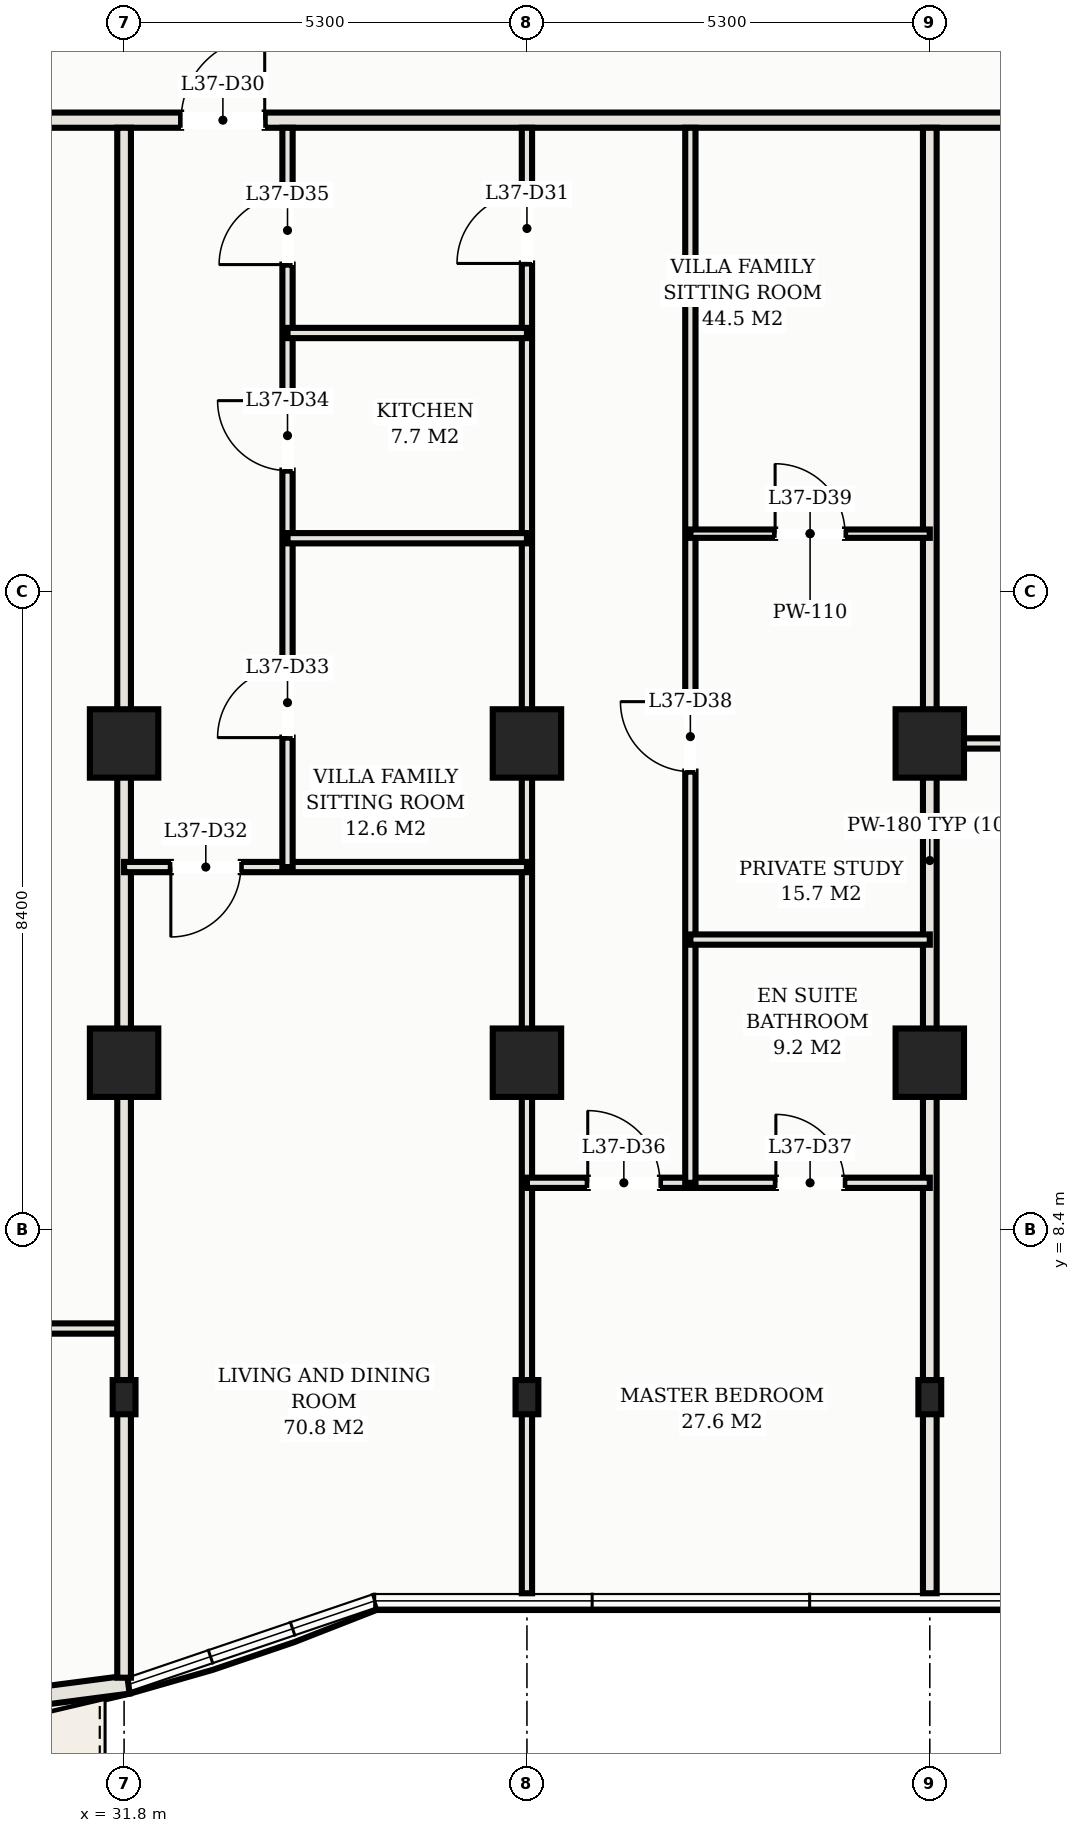
"""IFC4 building model, lengths in metres.
Left out: names, types, materials, properties, quantities, classifications, styles, units other than length and angle.
Written with IfcOpenShell. Run it as: python <this file> out.ifc"""

import sys

from ifc_helpers import new_model, si_unit, direction, frame, frame_2d, origin, origin_2d, place, context, subcontext, project, spatial, rectangle, hollow_rectangle, extrude, element, fill, save


model = new_model("IFC4")
c1 = context("Model", 3, precision=1e-05, world=origin(), true_north=direction((0.0, 1.0)))
c2 = subcontext(c1, "Body", "Model", "MODEL_VIEW")
j1 = project(units=[si_unit("LENGTHUNIT", "METRE"), si_unit("PLANEANGLEUNIT", "RADIAN")], contexts=[c1])
p1 = place(None, origin())
s1 = spatial("IfcSite", under=j1, at=p1, CompositionType="ELEMENT")
p2 = place(p1, origin())
s2 = spatial("IfcBuilding", under=s1, at=p2, CompositionType="ELEMENT")
p3 = place(p2, frame((0.0, 0.0, 139.2)))
s3 = spatial("IfcBuildingStorey", under=s2, at=p3, CompositionType="ELEMENT", Elevation=139.2)
for number, where, z_axis, x_axis in (
    (1, (31.8, 14.8, 0.0), (0.0, 0.0, 1.0), (1.0, 0.0, 0.0)),
    (2, (31.8, 10.6, 0.0), (0.0, 0.0, 1.0), (1.0, 0.0, 0.0)),
    (3, (37.1, 14.8, 0.0), (0.0, 0.0, 1.0), (1.0, 0.0, 0.0)),
    (4, (37.1, 10.6, 0.0), (0.0, 0.0, 1.0), (1.0, 0.0, 0.0)),
    (5, (42.4, 14.8, 0.0), (0.0, 0.0, 1.0), (1.0, 0.0, 0.0)),
    (6, (42.4, 10.6, 0.0), (0.0, 0.0, 1.0), (1.0, 0.0, 0.0)),
):
    element("IfcColumn", number, at=place(p3, frame(where, z_axis=z_axis, x_axis=x_axis)), inside=s3, PredefinedType="COLUMN", context=c2, shape_type="SweptSolid", body=[
        extrude(hollow_rectangle(XDim=0.9, YDim=0.9, WallThickness=0.032, at=origin_2d()), origin(), (0.0, 0.0, 1.0), 3.3),
    ])
for number, where, z_axis, x_axis in (
    (7, (31.8, 6.2, 0.0), (0.0, 0.0, 1.0), (1.0, 0.0, 0.0)),
    (8, (37.1, 6.2, 0.0), (0.0, 0.0, 1.0), (1.0, 0.0, 0.0)),
    (9, (42.4, 6.2, 0.0), (0.0, 0.0, 1.0), (1.0, 0.0, 0.0)),
):
    element("IfcColumn", number, at=place(p3, frame(where, z_axis=z_axis, x_axis=x_axis)), inside=s3, PredefinedType="COLUMN", context=c2, shape_type="SweptSolid", body=[
        extrude(hollow_rectangle(XDim=0.3, YDim=0.45, WallThickness=0.016, at=origin_2d()), origin(), (0.0, 0.0, 1.0), 3.3),
    ])
p4 = place(p3, frame((26.5, 1.72, 0.0), z_axis=(0.0, 0.0, 1.0), x_axis=(0.991594614239, 0.129383619568, 0.0)))
e10 = element("IfcWall", 10, at=p4, inside=s3, PredefinedType="SOLIDWALL", context=c2, shape_type="SweptSolid", body=[
    extrude(rectangle(XDim=5.402, YDim=0.24, at=frame_2d((2.701, 0.0))), origin(), (0.0, 0.0, 1.0), 3.1),
])
p5 = place(p4, frame((1.931, 0.0, 0.0)))
e11 = element("IfcOpeningElement", 11, at=p5, cuts=e10, PredefinedType="OPENING", context=c2, shape_type="SweptSolid", body=[
    extrude(rectangle(XDim=1.8, YDim=2.2, at=frame_2d((0.9, 1.1))), frame((0.0, 0.13, 0.0), z_axis=(0.0, -1.0, 0.0), x_axis=(1.0, 0.0, 0.0)), (0.0, 0.0, 1.0), 0.26),
])
p6 = place(p3, frame((4.32, 23.0, 0.0), z_axis=(0.0, 0.0, 1.0), x_axis=(1.0, 0.0, 0.0)))
e12 = element("IfcWall", 12, at=p6, inside=s3, PredefinedType="PARTITIONING", context=c2, shape_type="SweptSolid", body=[
    extrude(rectangle(XDim=44.36, YDim=0.2, at=frame_2d((22.18, 0.0))), origin(), (0.0, 0.0, 1.0), 2.38),
])
p7 = place(p6, frame((7.03, 0.0, 0.0)))
e13 = element("IfcOpeningElement", 13, at=p7, cuts=e12, PredefinedType="OPENING", context=c2, shape_type="SweptSolid", body=[
    extrude(rectangle(XDim=1.1, YDim=2.25, at=frame_2d((0.55, 1.125))), frame((0.0, 0.11, 0.0), z_axis=(0.0, -1.0, 0.0), x_axis=(1.0, 0.0, 0.0)), (0.0, 0.0, 1.0), 0.22),
])
p8 = place(p6, frame((12.83, 0.0, 0.0)))
e14 = element("IfcOpeningElement", 14, at=p8, cuts=e12, PredefinedType="OPENING", context=c2, shape_type="SweptSolid", body=[
    extrude(rectangle(XDim=1.1, YDim=2.25, at=frame_2d((0.55, 1.125))), frame((0.0, 0.11, 0.0), z_axis=(0.0, -1.0, 0.0), x_axis=(1.0, 0.0, 0.0)), (0.0, 0.0, 1.0), 0.22),
])
p9 = place(p6, frame((17.63, 0.0, 0.0)))
e15 = element("IfcOpeningElement", 15, at=p9, cuts=e12, PredefinedType="OPENING", context=c2, shape_type="SweptSolid", body=[
    extrude(rectangle(XDim=1.1, YDim=2.25, at=frame_2d((0.55, 1.125))), frame((0.0, 0.11, 0.0), z_axis=(0.0, -1.0, 0.0), x_axis=(1.0, 0.0, 0.0)), (0.0, 0.0, 1.0), 0.22),
])
p10 = place(p6, frame((28.23, 0.0, 0.0)))
e16 = element("IfcOpeningElement", 16, at=p10, cuts=e12, PredefinedType="OPENING", context=c2, shape_type="SweptSolid", body=[
    extrude(rectangle(XDim=1.1, YDim=2.25, at=frame_2d((0.55, 1.125))), frame((0.0, 0.11, 0.0), z_axis=(0.0, -1.0, 0.0), x_axis=(1.0, 0.0, 0.0)), (0.0, 0.0, 1.0), 0.22),
])
p11 = place(p6, frame((2.635, 0.0, 0.0)))
e17 = element("IfcOpeningElement", 17, at=p11, cuts=e12, PredefinedType="OPENING", context=c2, shape_type="SweptSolid", body=[
    extrude(rectangle(XDim=0.92, YDim=2.15, at=frame_2d((0.46, 1.075))), frame((0.0, 0.11, 0.0), z_axis=(0.0, -1.0, 0.0), x_axis=(1.0, 0.0, 0.0)), (0.0, 0.0, 1.0), 0.22),
])
p12 = place(p6, frame((40.805, 0.0, 0.0)))
e18 = element("IfcOpeningElement", 18, at=p12, cuts=e12, PredefinedType="OPENING", context=c2, shape_type="SweptSolid", body=[
    extrude(rectangle(XDim=0.92, YDim=2.15, at=frame_2d((0.46, 1.075))), frame((0.0, 0.11, 0.0), z_axis=(0.0, -1.0, 0.0), x_axis=(1.0, 0.0, 0.0)), (0.0, 0.0, 1.0), 0.22),
])
p13 = place(p3, frame((42.4, 3.62, 0.0), z_axis=(0.0, 0.0, 1.0), x_axis=(0.0, 1.0, 0.0)))
e19 = element("IfcWall", 19, at=p13, inside=s3, PredefinedType="PARTITIONING", context=c2, shape_type="SweptSolid", body=[
    extrude(rectangle(XDim=19.28, YDim=0.18, at=frame_2d((9.64, 0.0))), origin(), (0.0, 0.0, 1.0), 2.38),
])
p14 = place(p3, frame((21.2, 7.103, 0.0), z_axis=(0.0, 0.0, 1.0), x_axis=(1.0, 0.0, 0.0)))
e20 = element("IfcWall", 20, at=p14, inside=s3, PredefinedType="PARTITIONING", context=c2, shape_type="SweptSolid", body=[
    extrude(rectangle(XDim=10.6, YDim=0.135, at=frame_2d((5.3, 0.0))), origin(), (0.0, 0.0, 1.0), 2.38),
])
p15 = place(p14, frame((0.815, 0.0, 0.0)))
e21 = element("IfcOpeningElement", 21, at=p15, cuts=e20, PredefinedType="OPENING", context=c2, shape_type="SweptSolid", body=[
    extrude(rectangle(XDim=0.92, YDim=2.15, at=frame_2d((0.46, 1.075))), frame((0.0, 0.078, 0.0), z_axis=(0.0, -1.0, 0.0), x_axis=(1.0, 0.0, 0.0)), (0.0, 0.0, 1.0), 0.155),
])
p16 = place(p3, frame((31.8, 2.509, 0.0), z_axis=(0.0, 0.0, 1.0), x_axis=(0.0, 1.0, 0.0)))
e22 = element("IfcWall", 22, at=p16, inside=s3, PredefinedType="PARTITIONING", context=c2, shape_type="SweptSolid", body=[
    extrude(rectangle(XDim=20.391, YDim=0.18, at=frame_2d((10.195, 0.0))), origin(), (0.0, 0.0, 1.0), 2.38),
])
p17 = place(p3, frame((37.1, 3.62, 0.0), z_axis=(0.0, 0.0, 1.0), x_axis=(0.0, 1.0, 0.0)))
e23 = element("IfcWall", 23, at=p17, inside=s3, PredefinedType="PARTITIONING", context=c2, shape_type="SweptSolid", body=[
    extrude(rectangle(XDim=19.28, YDim=0.135, at=frame_2d((9.64, 0.0))), origin(), (0.0, 0.0, 1.0), 2.38),
])
p18 = place(p17, frame((17.495, 0.0, 0.0)))
e24 = element("IfcOpeningElement", 24, at=p18, cuts=e23, PredefinedType="OPENING", context=c2, shape_type="SweptSolid", body=[
    extrude(rectangle(XDim=0.92, YDim=2.15, at=frame_2d((0.46, 1.075))), frame((0.0, 0.078, 0.0), z_axis=(0.0, -1.0, 0.0), x_axis=(1.0, 0.0, 0.0)), (0.0, 0.0, 1.0), 0.155),
])
p19 = place(p3, frame((31.8, 13.174, 0.0), z_axis=(0.0, 0.0, 1.0), x_axis=(1.0, 0.0, 0.0)))
e25 = element("IfcWall", 25, at=p19, inside=s3, PredefinedType="PARTITIONING", context=c2, shape_type="SweptSolid", body=[
    extrude(rectangle(XDim=5.3, YDim=0.135, at=frame_2d((2.65, 0.0))), origin(), (0.0, 0.0, 1.0), 2.38),
])
p20 = place(p19, frame((0.615, 0.0, 0.0)))
e26 = element("IfcOpeningElement", 26, at=p20, cuts=e25, PredefinedType="OPENING", context=c2, shape_type="SweptSolid", body=[
    extrude(rectangle(XDim=0.92, YDim=2.15, at=frame_2d((0.46, 1.075))), frame((0.0, 0.078, 0.0), z_axis=(0.0, -1.0, 0.0), x_axis=(1.0, 0.0, 0.0)), (0.0, 0.0, 1.0), 0.155),
])
p21 = place(p3, frame((33.95, 13.174, 0.0), z_axis=(0.0, 0.0, 1.0), x_axis=(0.0, 1.0, 0.0)))
e27 = element("IfcWall", 27, at=p21, inside=s3, PredefinedType="PARTITIONING", context=c2, shape_type="SweptSolid", body=[
    extrude(rectangle(XDim=9.726, YDim=0.135, at=frame_2d((4.863, 0.0))), origin(), (0.0, 0.0, 1.0), 2.38),
])
p22 = place(p21, frame((1.703, 0.0, 0.0)))
e28 = element("IfcOpeningElement", 28, at=p22, cuts=e27, PredefinedType="OPENING", context=c2, shape_type="SweptSolid", body=[
    extrude(rectangle(XDim=0.92, YDim=2.15, at=frame_2d((0.46, 1.075))), frame((0.0, 0.078, 0.0), z_axis=(0.0, -1.0, 0.0), x_axis=(1.0, 0.0, 0.0)), (0.0, 0.0, 1.0), 0.155),
])
p23 = place(p21, frame((5.216, 0.0, 0.0)))
e29 = element("IfcOpeningElement", 29, at=p23, cuts=e27, PredefinedType="OPENING", context=c2, shape_type="SweptSolid", body=[
    extrude(rectangle(XDim=0.92, YDim=2.15, at=frame_2d((0.46, 1.075))), frame((0.0, 0.078, 0.0), z_axis=(0.0, -1.0, 0.0), x_axis=(1.0, 0.0, 0.0)), (0.0, 0.0, 1.0), 0.155),
])
p24 = place(p21, frame((7.926, 0.0, 0.0)))
e30 = element("IfcOpeningElement", 30, at=p24, cuts=e27, PredefinedType="OPENING", context=c2, shape_type="SweptSolid", body=[
    extrude(rectangle(XDim=0.9, YDim=2.15, at=frame_2d((0.45, 1.075))), frame((0.0, 0.078, 0.0), z_axis=(0.0, -1.0, 0.0), x_axis=(1.0, 0.0, 0.0)), (0.0, 0.0, 1.0), 0.155),
])
for number, where, z_axis, x_axis in (
    (31, (33.95, 17.5, 0.0), (0.0, 0.0, 1.0), (1.0, 0.0, 0.0)),
    (32, (33.95, 20.2, 0.0), (0.0, 0.0, 1.0), (1.0, 0.0, 0.0)),
):
    element("IfcWall", number, at=place(p3, frame(where, z_axis=z_axis, x_axis=x_axis)), inside=s3, PredefinedType="PARTITIONING", context=c2, shape_type="SweptSolid", body=[
        extrude(rectangle(XDim=3.15, YDim=0.135, at=frame_2d((1.575, 0.0))), origin(), (0.0, 0.0, 1.0), 2.38),
    ])
p25 = place(p3, frame((37.1, 9.02, 0.0), z_axis=(0.0, 0.0, 1.0), x_axis=(1.0, 0.0, 0.0)))
e33 = element("IfcWall", 33, at=p25, inside=s3, PredefinedType="PARTITIONING", context=c2, shape_type="SweptSolid", body=[
    extrude(rectangle(XDim=5.3, YDim=0.135, at=frame_2d((2.65, 0.0))), origin(), (0.0, 0.0, 1.0), 2.38),
])
p26 = place(p25, frame((0.8, 0.0, 0.0)))
e34 = element("IfcOpeningElement", 34, at=p26, cuts=e33, PredefinedType="OPENING", context=c2, shape_type="SweptSolid", body=[
    extrude(rectangle(XDim=0.95, YDim=2.15, at=frame_2d((0.475, 1.075))), frame((0.0, 0.078, 0.0), z_axis=(0.0, -1.0, 0.0), x_axis=(1.0, 0.0, 0.0)), (0.0, 0.0, 1.0), 0.155),
])
p27 = place(p25, frame((3.275, 0.0, 0.0)))
e35 = element("IfcOpeningElement", 35, at=p27, cuts=e33, PredefinedType="OPENING", context=c2, shape_type="SweptSolid", body=[
    extrude(rectangle(XDim=0.9, YDim=2.15, at=frame_2d((0.45, 1.075))), frame((0.0, 0.078, 0.0), z_axis=(0.0, -1.0, 0.0), x_axis=(1.0, 0.0, 0.0)), (0.0, 0.0, 1.0), 0.155),
])
p28 = place(p3, frame((39.25, 9.02, 0.0), z_axis=(0.0, 0.0, 1.0), x_axis=(0.0, 1.0, 0.0)))
e36 = element("IfcWall", 36, at=p28, inside=s3, PredefinedType="PARTITIONING", context=c2, shape_type="SweptSolid", body=[
    extrude(rectangle(XDim=13.88, YDim=0.135, at=frame_2d((6.94, 0.0))), origin(), (0.0, 0.0, 1.0), 2.38),
])
p29 = place(p28, frame((5.41, 0.0, 0.0)))
e37 = element("IfcOpeningElement", 37, at=p29, cuts=e36, PredefinedType="OPENING", context=c2, shape_type="SweptSolid", body=[
    extrude(rectangle(XDim=0.92, YDim=2.15, at=frame_2d((0.46, 1.075))), frame((0.0, 0.078, 0.0), z_axis=(0.0, -1.0, 0.0), x_axis=(1.0, 0.0, 0.0)), (0.0, 0.0, 1.0), 0.155),
])
p30 = place(p3, frame((39.25, 12.22, 0.0), z_axis=(0.0, 0.0, 1.0), x_axis=(1.0, 0.0, 0.0)))
e38 = element("IfcWall", 38, at=p30, inside=s3, PredefinedType="PARTITIONING", context=c2, shape_type="SweptSolid", body=[
    extrude(rectangle(XDim=3.15, YDim=0.135, at=frame_2d((1.575, 0.0))), origin(), (0.0, 0.0, 1.0), 2.38),
])
p31 = place(p3, frame((39.25, 17.56, 0.0), z_axis=(0.0, 0.0, 1.0), x_axis=(1.0, 0.0, 0.0)))
e39 = element("IfcWall", 39, at=p31, inside=s3, PredefinedType="MOVABLE", context=c2, shape_type="SweptSolid", body=[
    extrude(rectangle(XDim=3.15, YDim=0.11, at=frame_2d((1.575, 0.0))), origin(), (0.0, 0.0, 1.0), 2.38),
])
p32 = place(p31, frame((1.115, 0.0, 0.0)))
e40 = element("IfcOpeningElement", 40, at=p32, cuts=e39, PredefinedType="OPENING", context=c2, shape_type="SweptSolid", body=[
    extrude(rectangle(XDim=0.92, YDim=2.15, at=frame_2d((0.46, 1.075))), frame((0.0, 0.065, 0.0), z_axis=(0.0, -1.0, 0.0), x_axis=(1.0, 0.0, 0.0)), (0.0, 0.0, 1.0), 0.13),
])
p33 = place(p3, frame((42.4, 14.8, 0.0), z_axis=(0.0, 0.0, 1.0), x_axis=(1.0, 0.0, 0.0)))
e41 = element("IfcWall", 41, at=p33, inside=s3, PredefinedType="PARTITIONING", context=c2, shape_type="SweptSolid", body=[
    extrude(rectangle(XDim=6.18, YDim=0.135, at=frame_2d((3.09, 0.0))), origin(), (0.0, 0.0, 1.0), 2.38),
])
p34 = place(p33, frame((2.63, 0.0, 0.0)))
e42 = element("IfcOpeningElement", 42, at=p34, cuts=e41, PredefinedType="OPENING", context=c2, shape_type="SweptSolid", body=[
    extrude(rectangle(XDim=0.92, YDim=2.15, at=frame_2d((0.46, 1.075))), frame((0.0, 0.078, 0.0), z_axis=(0.0, -1.0, 0.0), x_axis=(1.0, 0.0, 0.0)), (0.0, 0.0, 1.0), 0.155),
])
p35 = place(p10, origin())
e43 = element("IfcDoor", 43, at=p35, inside=s3, OperationType="SINGLE_SWING_RIGHT", PredefinedType="DOOR", context=c2, shape_type="SweptSolid", body=[
    extrude(rectangle(XDim=1.1, YDim=2.25, at=frame_2d((0.55, 1.125))), frame((0.0, 0.025, 0.0), z_axis=(0.0, -1.0, 0.0), x_axis=(1.0, 0.0, 0.0)), (0.0, 0.0, 1.0), 0.05),
])
fill(e16, e43)
p36 = place(p18, origin())
e44 = element("IfcDoor", 44, at=p36, inside=s3, OperationType="SINGLE_SWING_LEFT", PredefinedType="DOOR", context=c2, shape_type="SweptSolid", body=[
    extrude(rectangle(XDim=0.92, YDim=2.15, at=frame_2d((0.46, 1.075))), frame((0.0, 0.025, 0.0), z_axis=(0.0, -1.0, 0.0), x_axis=(1.0, 0.0, 0.0)), (0.0, 0.0, 1.0), 0.05),
])
fill(e24, e44)
p37 = place(p20, frame((0.92, 0.0, 0.0), z_axis=(0.0, 0.0, 1.0), x_axis=(-1.0, 0.0, 0.0)))
e45 = element("IfcDoor", 45, at=p37, inside=s3, OperationType="SINGLE_SWING_RIGHT", PredefinedType="DOOR", context=c2, shape_type="SweptSolid", body=[
    extrude(rectangle(XDim=0.92, YDim=2.15, at=frame_2d((0.46, 1.075))), frame((0.0, 0.025, 0.0), z_axis=(0.0, -1.0, 0.0), x_axis=(1.0, 0.0, 0.0)), (0.0, 0.0, 1.0), 0.05),
])
fill(e26, e45)
p38 = place(p22, origin())
e46 = element("IfcDoor", 46, at=p38, inside=s3, OperationType="SINGLE_SWING_LEFT", PredefinedType="DOOR", context=c2, shape_type="SweptSolid", body=[
    extrude(rectangle(XDim=0.92, YDim=2.15, at=frame_2d((0.46, 1.075))), frame((0.0, 0.025, 0.0), z_axis=(0.0, -1.0, 0.0), x_axis=(1.0, 0.0, 0.0)), (0.0, 0.0, 1.0), 0.05),
])
fill(e28, e46)
p39 = place(p23, origin())
e47 = element("IfcDoor", 47, at=p39, inside=s3, OperationType="SINGLE_SWING_RIGHT", PredefinedType="DOOR", context=c2, shape_type="SweptSolid", body=[
    extrude(rectangle(XDim=0.92, YDim=2.15, at=frame_2d((0.46, 1.075))), frame((0.0, 0.025, 0.0), z_axis=(0.0, -1.0, 0.0), x_axis=(1.0, 0.0, 0.0)), (0.0, 0.0, 1.0), 0.05),
])
fill(e29, e47)
p40 = place(p24, origin())
e48 = element("IfcDoor", 48, at=p40, inside=s3, OperationType="SINGLE_SWING_LEFT", PredefinedType="DOOR", context=c2, shape_type="SweptSolid", body=[
    extrude(rectangle(XDim=0.9, YDim=2.15, at=frame_2d((0.45, 1.075))), frame((0.0, 0.025, 0.0), z_axis=(0.0, -1.0, 0.0), x_axis=(1.0, 0.0, 0.0)), (0.0, 0.0, 1.0), 0.05),
])
fill(e30, e48)
p41 = place(p26, origin())
e49 = element("IfcDoor", 49, at=p41, inside=s3, OperationType="SINGLE_SWING_LEFT", PredefinedType="DOOR", context=c2, shape_type="SweptSolid", body=[
    extrude(rectangle(XDim=0.95, YDim=2.15, at=frame_2d((0.475, 1.075))), frame((0.0, 0.025, 0.0), z_axis=(0.0, -1.0, 0.0), x_axis=(1.0, 0.0, 0.0)), (0.0, 0.0, 1.0), 0.05),
])
fill(e34, e49)
p42 = place(p27, origin())
e50 = element("IfcDoor", 50, at=p42, inside=s3, OperationType="SINGLE_SWING_LEFT", PredefinedType="DOOR", context=c2, shape_type="SweptSolid", body=[
    extrude(rectangle(XDim=0.9, YDim=2.15, at=frame_2d((0.45, 1.075))), frame((0.0, 0.025, 0.0), z_axis=(0.0, -1.0, 0.0), x_axis=(1.0, 0.0, 0.0)), (0.0, 0.0, 1.0), 0.05),
])
fill(e35, e50)
p43 = place(p29, origin())
e51 = element("IfcDoor", 51, at=p43, inside=s3, OperationType="SINGLE_SWING_RIGHT", PredefinedType="DOOR", context=c2, shape_type="SweptSolid", body=[
    extrude(rectangle(XDim=0.92, YDim=2.15, at=frame_2d((0.46, 1.075))), frame((0.0, 0.025, 0.0), z_axis=(0.0, -1.0, 0.0), x_axis=(1.0, 0.0, 0.0)), (0.0, 0.0, 1.0), 0.05),
])
fill(e37, e51)
p44 = place(p32, origin())
e52 = element("IfcDoor", 52, at=p44, inside=s3, OperationType="SINGLE_SWING_LEFT", PredefinedType="DOOR", context=c2, shape_type="SweptSolid", body=[
    extrude(rectangle(XDim=0.92, YDim=2.15, at=frame_2d((0.46, 1.075))), frame((0.0, 0.025, 0.0), z_axis=(0.0, -1.0, 0.0), x_axis=(1.0, 0.0, 0.0)), (0.0, 0.0, 1.0), 0.05),
])
fill(e40, e52)
save(model, sys.argv[1])
